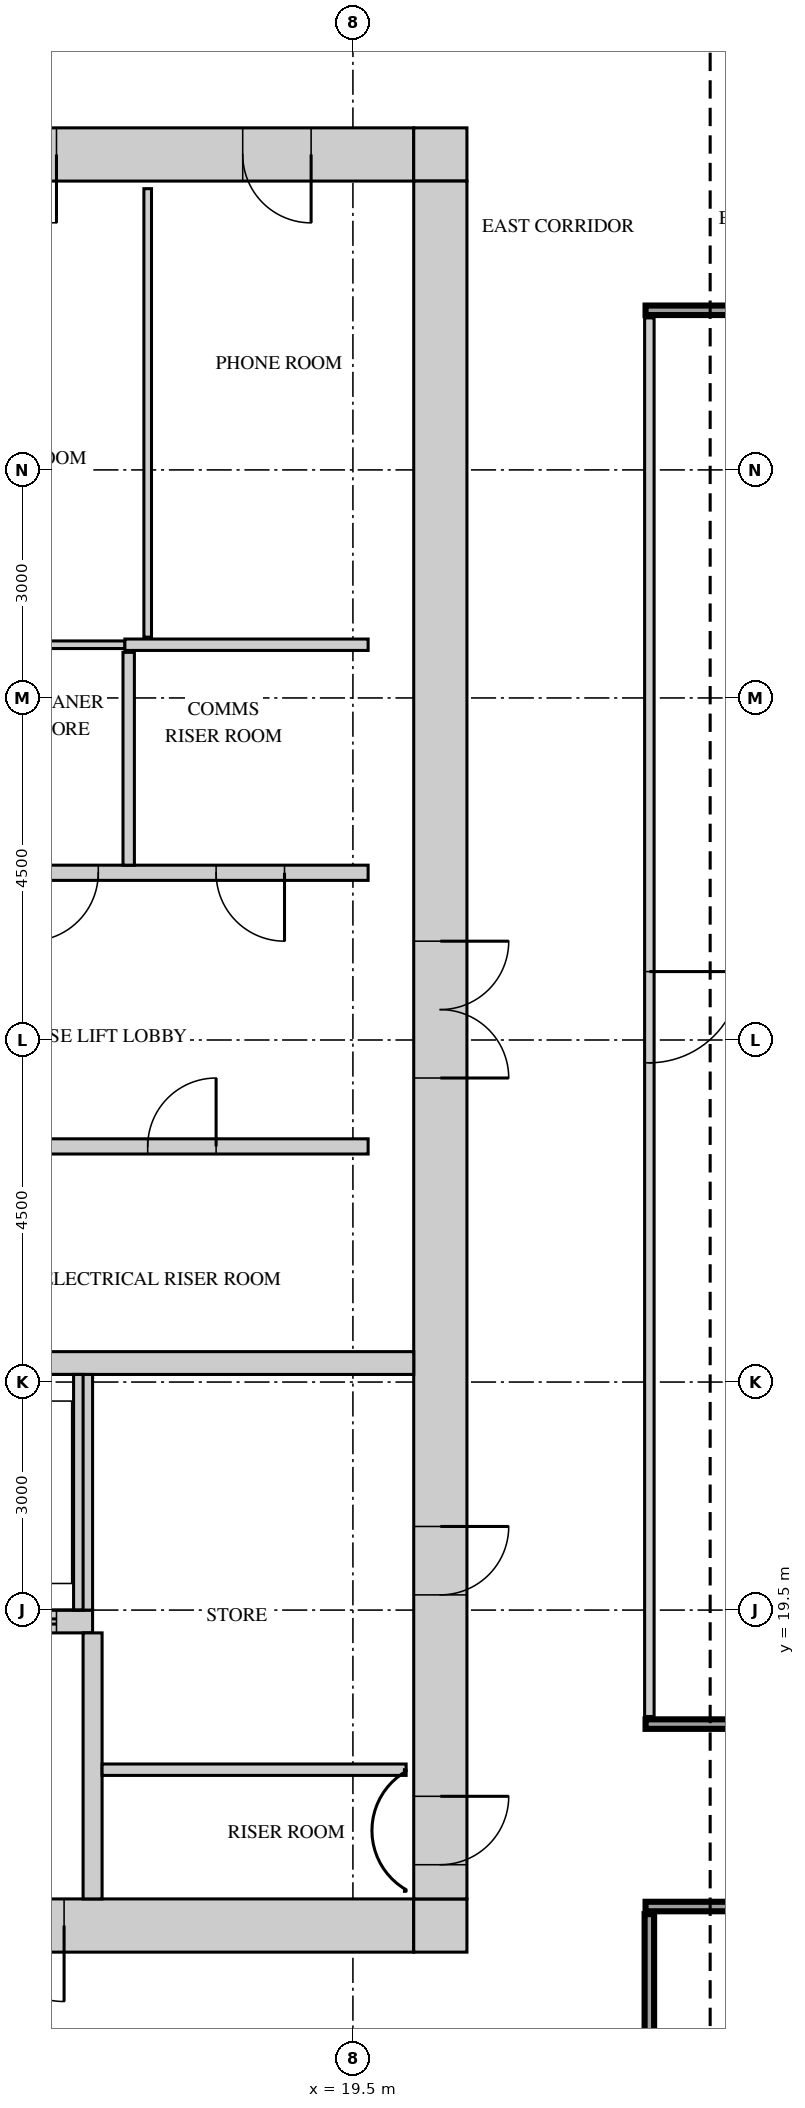
"""IFC4 building model, lengths in metres.
Left out: names, types, materials, properties, quantities, classifications, styles, units other than length and angle.
Written with IfcOpenShell. Run it as: python <this file> out.ifc"""

import sys

from ifc_helpers import new_model, si_unit, direction, frame, frame_2d, origin, place, context, subcontext, project, spatial, rectangle, extrude, source, transform, mapped, element, fill, save


model = new_model("IFC4")
c1 = context("Model", 3, precision=1e-05, world=origin(), true_north=direction((0.0, 1.0)))
c2 = subcontext(c1, "Body", "Model", "MODEL_VIEW")
j1 = project(units=[si_unit("LENGTHUNIT", "METRE"), si_unit("PLANEANGLEUNIT", "RADIAN")], contexts=[c1])
p1 = place(None, origin())
s1 = spatial("IfcSite", under=j1, at=p1, CompositionType="ELEMENT")
p2 = place(p1, origin())
s2 = spatial("IfcBuilding", under=s1, at=p2, CompositionType="ELEMENT")
p3 = place(p2, frame((0.0, 0.0, 266.2)))
s3 = spatial("IfcBuildingStorey", under=s2, at=p3, CompositionType="ELEMENT", Elevation=266.2)
m1 = source(origin(), c2, "Body", "SweptSolid", [
    extrude(rectangle(XDim=13.6, YDim=0.7, at=frame_2d((6.8, 0.0))), origin(), (0.0, 0.0, 1.0), 3.75),
])
p4 = place(p3, frame((6.7, 38.65, 0.0), z_axis=(0.0, 0.0, 1.0), x_axis=(1.0, 0.0, 0.0)))
e1 = element("IfcWall", 1, at=p4, inside=s3, PredefinedType="SHEAR", context=c2, shape_type="MappedRepresentation", body=[
    mapped(m1, transform((0.0, 0.0, 0.0))),
])
m2 = source(origin(), c2, "Body", "SweptSolid", [
    extrude(rectangle(XDim=0.9, YDim=2.1, at=frame_2d((0.45, 1.05))), frame((0.0, 0.36, 0.0), z_axis=(0.0, -1.0, 0.0), x_axis=(1.0, 0.0, 0.0)), (0.0, 0.0, 1.0), 0.72),
])
p5 = place(p4, frame((3.0, 0.0, 0.0)))
e2 = element("IfcOpeningElement", 2, at=p5, cuts=e1, PredefinedType="OPENING", context=c2, shape_type="MappedRepresentation", body=[
    mapped(m2, transform((0.0, 0.0, 0.0))),
])
p6 = place(p4, frame((8.0, 0.0, 0.0)))
e3 = element("IfcOpeningElement", 3, at=p6, cuts=e1, PredefinedType="OPENING", context=c2, shape_type="MappedRepresentation", body=[
    mapped(m2, transform((0.0, 0.0, 0.0))),
])
p7 = place(p4, frame((11.35, 0.0, 0.0)))
e4 = element("IfcOpeningElement", 4, at=p7, cuts=e1, PredefinedType="OPENING", context=c2, shape_type="MappedRepresentation", body=[
    mapped(m2, transform((0.0, 0.0, 0.0))),
])
m3 = source(origin(), c2, "Body", "SweptSolid", [
    extrude(rectangle(XDim=0.7, YDim=0.7, at=frame_2d((0.35, 0.0))), origin(), (0.0, 0.0, 1.0), 3.75),
])
p8 = place(p3, frame((20.3, 38.65, 0.0), z_axis=(0.0, 0.0, 1.0), x_axis=(1.0, 0.0, 0.0)))
e5 = element("IfcWall", 5, at=p8, inside=s3, PredefinedType="SHEAR", context=c2, shape_type="MappedRepresentation", body=[
    mapped(m3, transform((0.0, 0.0, 0.0))),
])
p9 = place(p3, frame((6.7, 15.35, 0.0), z_axis=(0.0, 0.0, 1.0), x_axis=(1.0, 0.0, 0.0)))
e6 = element("IfcWall", 6, at=p9, inside=s3, PredefinedType="SHEAR", context=c2, shape_type="MappedRepresentation", body=[
    mapped(m1, transform((0.0, 0.0, 0.0))),
])
m4 = source(origin(), c2, "Body", "SweptSolid", [
    extrude(rectangle(XDim=1.2, YDim=2.1, at=frame_2d((0.6, 1.05))), frame((0.0, 0.36, 0.0), z_axis=(0.0, -1.0, 0.0), x_axis=(1.0, 0.0, 0.0)), (0.0, 0.0, 1.0), 0.72),
])
p10 = place(p9, frame((5.5, 0.0, 0.0)))
e7 = element("IfcOpeningElement", 7, at=p10, cuts=e6, PredefinedType="OPENING", context=c2, shape_type="MappedRepresentation", body=[
    mapped(m4, transform((0.0, 0.0, 0.0))),
])
p11 = place(p9, frame((2.15, 0.0, 0.0)))
e8 = element("IfcOpeningElement", 8, at=p11, cuts=e6, PredefinedType="OPENING", context=c2, shape_type="MappedRepresentation", body=[
    mapped(m4, transform((0.0, 0.0, 0.0))),
])
m5 = source(origin(), c2, "Body", "SweptSolid", [
    extrude(rectangle(XDim=1.0, YDim=2.1, at=frame_2d((0.5, 1.05))), frame((0.0, 0.36, 0.0), z_axis=(0.0, -1.0, 0.0), x_axis=(1.0, 0.0, 0.0)), (0.0, 0.0, 1.0), 0.72),
])
p12 = place(p9, frame((8.0, 0.0, 0.0)))
e9 = element("IfcOpeningElement", 9, at=p12, cuts=e6, PredefinedType="OPENING", context=c2, shape_type="MappedRepresentation", body=[
    mapped(m5, transform((0.0, 0.0, 0.0))),
])
p13 = place(p3, frame((20.3, 15.35, 0.0), z_axis=(0.0, 0.0, 1.0), x_axis=(1.0, 0.0, 0.0)))
e10 = element("IfcWall", 10, at=p13, inside=s3, PredefinedType="SHEAR", context=c2, shape_type="MappedRepresentation", body=[
    mapped(m3, transform((0.0, 0.0, 0.0))),
])
m6 = source(origin(), c2, "Body", "SweptSolid", [
    extrude(rectangle(XDim=22.6, YDim=0.7, at=frame_2d((11.3, 0.0))), origin(), (0.0, 0.0, 1.0), 3.75),
])
p14 = place(p3, frame((20.65, 15.7, 0.0), z_axis=(0.0, 0.0, 1.0), x_axis=(0.0, 1.0, 0.0)))
e11 = element("IfcWall", 11, at=p14, inside=s3, PredefinedType="SHEAR", context=c2, shape_type="MappedRepresentation", body=[
    mapped(m6, transform((0.0, 0.0, 0.0))),
])
m7 = source(origin(), c2, "Body", "SweptSolid", [
    extrude(rectangle(XDim=1.8, YDim=2.1, at=frame_2d((0.9, 1.05))), frame((0.0, 0.36, 0.0), z_axis=(0.0, -1.0, 0.0), x_axis=(1.0, 0.0, 0.0)), (0.0, 0.0, 1.0), 0.72),
])
p15 = place(p14, frame((10.8, 0.0, 0.0)))
e12 = element("IfcOpeningElement", 12, at=p15, cuts=e11, PredefinedType="OPENING", context=c2, shape_type="MappedRepresentation", body=[
    mapped(m7, transform((0.0, 0.0, 0.0))),
])
p16 = place(p14, frame((0.45, 0.0, 0.0)))
e13 = element("IfcOpeningElement", 13, at=p16, cuts=e11, PredefinedType="OPENING", context=c2, shape_type="MappedRepresentation", body=[
    mapped(m2, transform((0.0, 0.0, 0.0))),
])
p17 = place(p14, frame((4.0, 0.0, 0.0)))
e14 = element("IfcOpeningElement", 14, at=p17, cuts=e11, PredefinedType="OPENING", context=c2, shape_type="MappedRepresentation", body=[
    mapped(m2, transform((0.0, 0.0, 0.0))),
])
m8 = source(origin(), c2, "Body", "SweptSolid", [
    extrude(rectangle(XDim=13.6, YDim=0.3, at=frame_2d((6.8, 0.0))), origin(), (0.0, 0.0, 1.0), 3.75),
])
p18 = place(p3, frame((6.7, 22.75, 0.0), z_axis=(0.0, 0.0, 1.0), x_axis=(1.0, 0.0, 0.0)))
e15 = element("IfcWall", 15, at=p18, inside=s3, PredefinedType="STANDARD", context=c2, shape_type="MappedRepresentation", body=[
    mapped(m8, transform((0.0, 0.0, 0.0))),
])
m9 = source(origin(), c2, "Body", "SweptSolid", [
    extrude(rectangle(XDim=9.375, YDim=0.3, at=frame_2d((4.688, 0.0))), origin(), (0.0, 0.0, 1.0), 3.75),
])
p19 = place(p3, frame((6.7, 19.35, 0.0), z_axis=(0.0, 0.0, 1.0), x_axis=(1.0, 0.0, 0.0)))
e16 = element("IfcWall", 16, at=p19, inside=s3, PredefinedType="STANDARD", context=c2, shape_type="MappedRepresentation", body=[
    mapped(m9, transform((0.0, 0.0, 0.0))),
])
m10 = source(origin(), c2, "Body", "SweptSolid", [
    extrude(rectangle(XDim=1.2, YDim=2.1, at=frame_2d((0.6, 1.05))), frame((0.0, 0.16, 0.0), z_axis=(0.0, -1.0, 0.0), x_axis=(1.0, 0.0, 0.0)), (0.0, 0.0, 1.0), 0.32),
])
p20 = place(p19, frame((0.95, 0.0, 0.0)))
e17 = element("IfcOpeningElement", 17, at=p20, cuts=e16, PredefinedType="OPENING", context=c2, shape_type="MappedRepresentation", body=[
    mapped(m10, transform((0.0, 0.0, 0.0))),
])
p21 = place(p19, frame((3.3, 0.0, 0.0)))
e18 = element("IfcOpeningElement", 18, at=p21, cuts=e16, PredefinedType="OPENING", context=c2, shape_type="MappedRepresentation", body=[
    mapped(m10, transform((0.0, 0.0, 0.0))),
])
p22 = place(p19, frame((5.55, 0.0, 0.0)))
e19 = element("IfcOpeningElement", 19, at=p22, cuts=e16, PredefinedType="OPENING", context=c2, shape_type="MappedRepresentation", body=[
    mapped(m10, transform((0.0, 0.0, 0.0))),
])
p23 = place(p19, frame((7.7, 0.0, 0.0)))
e20 = element("IfcOpeningElement", 20, at=p23, cuts=e16, PredefinedType="OPENING", context=c2, shape_type="MappedRepresentation", body=[
    mapped(m10, transform((0.0, 0.0, 0.0))),
])
m11 = source(origin(), c2, "Body", "SweptSolid", [
    extrude(rectangle(XDim=3.1, YDim=0.25, at=frame_2d((1.55, 0.0))), origin(), (0.0, 0.0, 1.0), 3.75),
])
p24 = place(p3, frame((15.95, 19.5, 0.0), z_axis=(0.0, 0.0, 1.0), x_axis=(0.0, 1.0, 0.0)))
e21 = element("IfcWall", 21, at=p24, inside=s3, PredefinedType="STANDARD", context=c2, shape_type="MappedRepresentation", body=[
    mapped(m11, transform((0.0, 0.0, 0.0))),
])
m12 = source(origin(), c2, "Body", "SweptSolid", [
    extrude(rectangle(XDim=3.5, YDim=0.25, at=frame_2d((1.75, 0.0))), origin(), (0.0, 0.0, 1.0), 3.75),
])
p25 = place(p3, frame((16.075, 15.7, 0.0), z_axis=(0.0, 0.0, 1.0), x_axis=(0.0, 1.0, 0.0)))
e22 = element("IfcWall", 22, at=p25, inside=s3, PredefinedType="STANDARD", context=c2, shape_type="MappedRepresentation", body=[
    mapped(m12, transform((0.0, 0.0, 0.0))),
])
m13 = source(origin(), c2, "Body", "SweptSolid", [
    extrude(rectangle(XDim=10.85, YDim=0.125, at=frame_2d((5.425, 0.0))), origin(), (0.0, 0.0, 1.0), 3.8),
])
p26 = place(p3, frame((23.4, 4.65, 0.0), z_axis=(0.0, 0.0, 1.0), x_axis=(0.0, 1.0, 0.0)))
e23 = element("IfcWall", 23, at=p26, inside=s3, PredefinedType="PARTITIONING", context=c2, shape_type="MappedRepresentation", body=[
    mapped(m13, transform((0.0, 0.0, 0.0))),
])
m14 = source(origin(), c2, "Body", "SweptSolid", [
    extrude(rectangle(XDim=0.9, YDim=2.1, at=frame_2d((0.45, 1.05))), frame((0.0, 0.073, 0.0), z_axis=(0.0, -1.0, 0.0), x_axis=(1.0, 0.0, 0.0)), (0.0, 0.0, 1.0), 0.145),
])
p27 = place(p26, frame((4.5, 0.0, 0.0)))
e24 = element("IfcOpeningElement", 24, at=p27, cuts=e23, PredefinedType="OPENING", context=c2, shape_type="MappedRepresentation", body=[
    mapped(m14, transform((0.0, 0.0, 0.0))),
])
m15 = source(origin(), c2, "Body", "SweptSolid", [
    extrude(rectangle(XDim=26.0, YDim=0.125, at=frame_2d((13.0, 0.0))), origin(), (0.0, 0.0, 1.0), 3.8),
])
p28 = place(p3, frame((23.35, 15.6, 0.0), z_axis=(0.0, 0.0, 1.0), x_axis=(1.0, 0.0, 0.0)))
e25 = element("IfcWall", 25, at=p28, inside=s3, PredefinedType="PARTITIONING", context=c2, shape_type="MappedRepresentation", body=[
    mapped(m15, transform((0.0, 0.0, 0.0))),
])
p29 = place(p28, frame((4.05, 0.0, 0.0)))
e26 = element("IfcOpeningElement", 26, at=p29, cuts=e25, PredefinedType="OPENING", context=c2, shape_type="MappedRepresentation", body=[
    mapped(m14, transform((0.0, 0.0, 0.0))),
])
m16 = source(origin(), c2, "Body", "SweptSolid", [
    extrude(rectangle(XDim=1.0, YDim=2.1, at=frame_2d((0.5, 1.05))), frame((0.0, 0.073, 0.0), z_axis=(0.0, -1.0, 0.0), x_axis=(1.0, 0.0, 0.0)), (0.0, 0.0, 1.0), 0.145),
])
p30 = place(p28, frame((6.85, 0.0, 0.0)))
e27 = element("IfcOpeningElement", 27, at=p30, cuts=e25, PredefinedType="OPENING", context=c2, shape_type="MappedRepresentation", body=[
    mapped(m16, transform((0.0, 0.0, 0.0))),
])
p31 = place(p28, frame((12.3, 0.0, 0.0)))
e28 = element("IfcOpeningElement", 28, at=p31, cuts=e25, PredefinedType="OPENING", context=c2, shape_type="MappedRepresentation", body=[
    mapped(m14, transform((0.0, 0.0, 0.0))),
])
m17 = source(origin(), c2, "Body", "SweptSolid", [
    extrude(rectangle(XDim=1.2, YDim=2.1, at=frame_2d((0.6, 1.05))), frame((0.0, 0.073, 0.0), z_axis=(0.0, -1.0, 0.0), x_axis=(1.0, 0.0, 0.0)), (0.0, 0.0, 1.0), 0.145),
])
p32 = place(p28, frame((20.8, 0.0, 0.0)))
e29 = element("IfcOpeningElement", 29, at=p32, cuts=e25, PredefinedType="OPENING", context=c2, shape_type="MappedRepresentation", body=[
    mapped(m17, transform((0.0, 0.0, 0.0))),
])
m18 = source(origin(), c2, "Body", "SweptSolid", [
    extrude(rectangle(XDim=4.0, YDim=0.15, at=frame_2d((2.0, 0.0))), origin(), (0.0, 0.0, 1.0), 3.8),
])
p33 = place(p3, frame((16.2, 17.4, 0.0), z_axis=(0.0, 0.0, 1.0), x_axis=(1.0, 0.0, 0.0)))
e30 = element("IfcWall", 30, at=p33, inside=s3, PredefinedType="PARTITIONING", context=c2, shape_type="MappedRepresentation", body=[
    mapped(m18, transform((0.0, 0.0, 0.0))),
])
p34 = place(p3, frame((23.35, 18.0, 0.0), z_axis=(0.0, 0.0, 1.0), x_axis=(1.0, 0.0, 0.0)))
e31 = element("IfcWall", 31, at=p34, inside=s3, PredefinedType="PARTITIONING", context=c2, shape_type="MappedRepresentation", body=[
    mapped(m15, transform((0.0, 0.0, 0.0))),
])
p35 = place(p34, frame((19.55, 0.0, 0.0)))
e32 = element("IfcOpeningElement", 32, at=p35, cuts=e31, PredefinedType="OPENING", context=c2, shape_type="MappedRepresentation", body=[
    mapped(m17, transform((0.0, 0.0, 0.0))),
])
m19 = source(origin(), c2, "Body", "SweptSolid", [
    extrude(rectangle(XDim=18.4, YDim=0.125, at=frame_2d((9.2, 0.0))), origin(), (0.0, 0.0, 1.0), 3.8),
])
p36 = place(p3, frame((23.4, 18.1, 0.0), z_axis=(0.0, 0.0, 1.0), x_axis=(0.0, 1.0, 0.0)))
e33 = element("IfcWall", 33, at=p36, inside=s3, PredefinedType="PARTITIONING", context=c2, shape_type="MappedRepresentation", body=[
    mapped(m19, transform((0.0, 0.0, 0.0))),
])
p37 = place(p36, frame((8.6, 0.0, 0.0)))
e34 = element("IfcOpeningElement", 34, at=p37, cuts=e33, PredefinedType="OPENING", context=c2, shape_type="MappedRepresentation", body=[
    mapped(m17, transform((0.0, 0.0, 0.0))),
])
m20 = source(origin(), c2, "Body", "SweptSolid", [
    extrude(rectangle(XDim=4.85, YDim=0.2, at=frame_2d((2.425, 0.0))), origin(), (0.0, 0.0, 1.0), 3.8),
])
p38 = place(p3, frame((14.85, 25.6, 0.0), z_axis=(0.0, 0.0, 1.0), x_axis=(1.0, 0.0, 0.0)))
e35 = element("IfcWall", 35, at=p38, inside=s3, PredefinedType="PARTITIONING", context=c2, shape_type="MappedRepresentation", body=[
    mapped(m20, transform((0.0, 0.0, 0.0))),
])
m21 = source(origin(), c2, "Body", "SweptSolid", [
    extrude(rectangle(XDim=0.9, YDim=2.1, at=frame_2d((0.45, 1.05))), frame((0.0, 0.11, 0.0), z_axis=(0.0, -1.0, 0.0), x_axis=(1.0, 0.0, 0.0)), (0.0, 0.0, 1.0), 0.22),
])
p39 = place(p38, frame((1.95, 0.0, 0.0)))
e36 = element("IfcOpeningElement", 36, at=p39, cuts=e35, PredefinedType="OPENING", context=c2, shape_type="MappedRepresentation", body=[
    mapped(m21, transform((0.0, 0.0, 0.0))),
])
p40 = place(p3, frame((14.85, 29.2, 0.0), z_axis=(0.0, 0.0, 1.0), x_axis=(1.0, 0.0, 0.0)))
e37 = element("IfcWall", 37, at=p40, inside=s3, PredefinedType="PARTITIONING", context=c2, shape_type="MappedRepresentation", body=[
    mapped(m20, transform((0.0, 0.0, 0.0))),
])
p41 = place(p40, frame((0.4, 0.0, 0.0)))
e38 = element("IfcOpeningElement", 38, at=p41, cuts=e37, PredefinedType="OPENING", context=c2, shape_type="MappedRepresentation", body=[
    mapped(m21, transform((0.0, 0.0, 0.0))),
])
p42 = place(p40, frame((2.85, 0.0, 0.0)))
e39 = element("IfcOpeningElement", 39, at=p42, cuts=e37, PredefinedType="OPENING", context=c2, shape_type="MappedRepresentation", body=[
    mapped(m21, transform((0.0, 0.0, 0.0))),
])
m22 = source(origin(), c2, "Body", "SweptSolid", [
    extrude(rectangle(XDim=2.8, YDim=0.15, at=frame_2d((1.4, 0.0))), origin(), (0.0, 0.0, 1.0), 3.8),
])
p43 = place(p3, frame((16.55, 29.3, 0.0), z_axis=(0.0, 0.0, 1.0), x_axis=(0.0, 1.0, 0.0)))
e40 = element("IfcWall", 40, at=p43, inside=s3, PredefinedType="PARTITIONING", context=c2, shape_type="MappedRepresentation", body=[
    mapped(m22, transform((0.0, 0.0, 0.0))),
])
m23 = source(origin(), c2, "Body", "SweptSolid", [
    extrude(rectangle(XDim=1.65, YDim=0.1, at=frame_2d((0.825, 0.0))), origin(), (0.0, 0.0, 1.0), 3.8),
])
p44 = place(p3, frame((14.85, 32.2, 0.0), z_axis=(0.0, 0.0, 1.0), x_axis=(1.0, 0.0, 0.0)))
e41 = element("IfcWall", 41, at=p44, inside=s3, PredefinedType="PARTITIONING", context=c2, shape_type="MappedRepresentation", body=[
    mapped(m23, transform((0.0, 0.0, 0.0))),
])
m24 = source(origin(), c2, "Body", "SweptSolid", [
    extrude(rectangle(XDim=3.2, YDim=0.15, at=frame_2d((1.6, 0.0))), origin(), (0.0, 0.0, 1.0), 3.8),
])
p45 = place(p3, frame((16.5, 32.2, 0.0), z_axis=(0.0, 0.0, 1.0), x_axis=(1.0, 0.0, 0.0)))
e42 = element("IfcWall", 42, at=p45, inside=s3, PredefinedType="PARTITIONING", context=c2, shape_type="MappedRepresentation", body=[
    mapped(m24, transform((0.0, 0.0, 0.0))),
])
m25 = source(origin(), c2, "Body", "SweptSolid", [
    extrude(rectangle(XDim=5.9, YDim=0.1, at=frame_2d((2.95, 0.0))), origin(), (0.0, 0.0, 1.0), 3.8),
])
p46 = place(p3, frame((16.8, 32.3, 0.0), z_axis=(0.0, 0.0, 1.0), x_axis=(0.0, 1.0, 0.0)))
e43 = element("IfcWall", 43, at=p46, inside=s3, PredefinedType="PARTITIONING", context=c2, shape_type="MappedRepresentation", body=[
    mapped(m25, transform((0.0, 0.0, 0.0))),
])
p47 = place(p3, frame((23.35, 36.6, 0.0), z_axis=(0.0, 0.0, 1.0), x_axis=(1.0, 0.0, 0.0)))
e44 = element("IfcWall", 44, at=p47, inside=s3, PredefinedType="PARTITIONING", context=c2, shape_type="MappedRepresentation", body=[
    mapped(m15, transform((0.0, 0.0, 0.0))),
])
m26 = source(origin(), c2, "Body", "SweptSolid", [
    extrude(rectangle(XDim=0.9, YDim=2.1, at=frame_2d((0.45, 1.05))), frame((0.0, 0.025, 0.0), z_axis=(0.0, -1.0, 0.0), x_axis=(1.0, 0.0, 0.0)), (0.0, 0.0, 1.0), 0.05),
])
p48 = place(p39, origin())
e45 = element("IfcDoor", 45, at=p48, inside=s3, OperationType="SINGLE_SWING_LEFT", PredefinedType="DOOR", context=c2, shape_type="MappedRepresentation", body=[
    mapped(m26, transform((0.0, 0.0, 0.0))),
])
fill(e36, e45)
p49 = place(p41, origin())
e46 = element("IfcDoor", 46, at=p49, inside=s3, OperationType="SINGLE_SWING_LEFT", PredefinedType="DOOR", context=c2, shape_type="MappedRepresentation", body=[
    mapped(m26, transform((0.0, 0.0, 0.0))),
])
fill(e38, e46)
p50 = place(p42, origin())
e47 = element("IfcDoor", 47, at=p50, inside=s3, OperationType="SINGLE_SWING_RIGHT", PredefinedType="DOOR", context=c2, shape_type="MappedRepresentation", body=[
    mapped(m26, transform((0.0, 0.0, 0.0))),
])
fill(e39, e47)
m27 = source(origin(), c2, "Body", "SweptSolid", [
    extrude(rectangle(XDim=1.8, YDim=2.1, at=frame_2d((0.9, 1.05))), frame((0.0, 0.3, 0.0), z_axis=(0.0, -1.0, 0.0), x_axis=(1.0, 0.0, 0.0)), (0.0, 0.0, 1.0), 0.6),
])
p51 = place(p15, origin())
e48 = element("IfcDoor", 48, at=p51, inside=s3, OperationType="DOUBLE_DOOR_SINGLE_SWING", PredefinedType="DOOR", context=c2, shape_type="MappedRepresentation", body=[
    mapped(m27, transform((0.0, 0.0, 0.0))),
])
fill(e12, e48)
m28 = source(origin(), c2, "Body", "SweptSolid", [
    extrude(rectangle(XDim=0.9, YDim=2.1, at=frame_2d((0.45, 1.05))), frame((0.0, 0.3, 0.0), z_axis=(0.0, -1.0, 0.0), x_axis=(1.0, 0.0, 0.0)), (0.0, 0.0, 1.0), 0.6),
])
p52 = place(p6, origin())
e49 = element("IfcDoor", 49, at=p52, inside=s3, OperationType="SINGLE_SWING_RIGHT", PredefinedType="DOOR", context=c2, shape_type="MappedRepresentation", body=[
    mapped(m28, transform((0.0, 0.0, 0.0))),
])
fill(e3, e49)
p53 = place(p7, origin())
e50 = element("IfcDoor", 50, at=p53, inside=s3, OperationType="SINGLE_SWING_RIGHT", PredefinedType="DOOR", context=c2, shape_type="MappedRepresentation", body=[
    mapped(m28, transform((0.0, 0.0, 0.0))),
])
fill(e4, e50)
p54 = place(p16, origin())
e51 = element("IfcDoor", 51, at=p54, inside=s3, OperationType="SINGLE_SWING_RIGHT", PredefinedType="DOOR", context=c2, shape_type="MappedRepresentation", body=[
    mapped(m28, transform((0.0, 0.0, 0.0))),
])
fill(e13, e51)
p55 = place(p17, origin())
e52 = element("IfcDoor", 52, at=p55, inside=s3, OperationType="SINGLE_SWING_RIGHT", PredefinedType="DOOR", context=c2, shape_type="MappedRepresentation", body=[
    mapped(m28, transform((0.0, 0.0, 0.0))),
])
fill(e14, e52)
m29 = source(origin(), c2, "Body", "SweptSolid", [
    extrude(rectangle(XDim=1.0, YDim=2.1, at=frame_2d((0.5, 1.05))), frame((0.0, 0.3, 0.0), z_axis=(0.0, -1.0, 0.0), x_axis=(1.0, 0.0, 0.0)), (0.0, 0.0, 1.0), 0.6),
])
p56 = place(p12, origin())
e53 = element("IfcDoor", 53, at=p56, inside=s3, OperationType="SINGLE_SWING_RIGHT", PredefinedType="DOOR", context=c2, shape_type="MappedRepresentation", body=[
    mapped(m29, transform((0.0, 0.0, 0.0))),
])
fill(e9, e53)
m30 = source(origin(), c2, "Body", "SweptSolid", [
    extrude(rectangle(XDim=1.2, YDim=2.1, at=frame_2d((0.6, 1.05))), frame((0.0, 0.025, 0.0), z_axis=(0.0, -1.0, 0.0), x_axis=(1.0, 0.0, 0.0)), (0.0, 0.0, 1.0), 0.05),
])
p57 = place(p37, origin())
e54 = element("IfcDoor", 54, at=p57, inside=s3, OperationType="SINGLE_SWING_RIGHT", PredefinedType="DOOR", context=c2, shape_type="MappedRepresentation", body=[
    mapped(m30, transform((0.0, 0.0, 0.0))),
])
fill(e34, e54)
p58 = place(p23, origin())
e55 = element("IfcDoor", 55, at=p58, inside=s3, OperationType="DOUBLE_DOOR_SLIDING", PredefinedType="DOOR", context=c2, shape_type="MappedRepresentation", body=[
    mapped(m30, transform((0.0, 0.0, 0.0))),
])
fill(e20, e55)
save(model, sys.argv[1])
